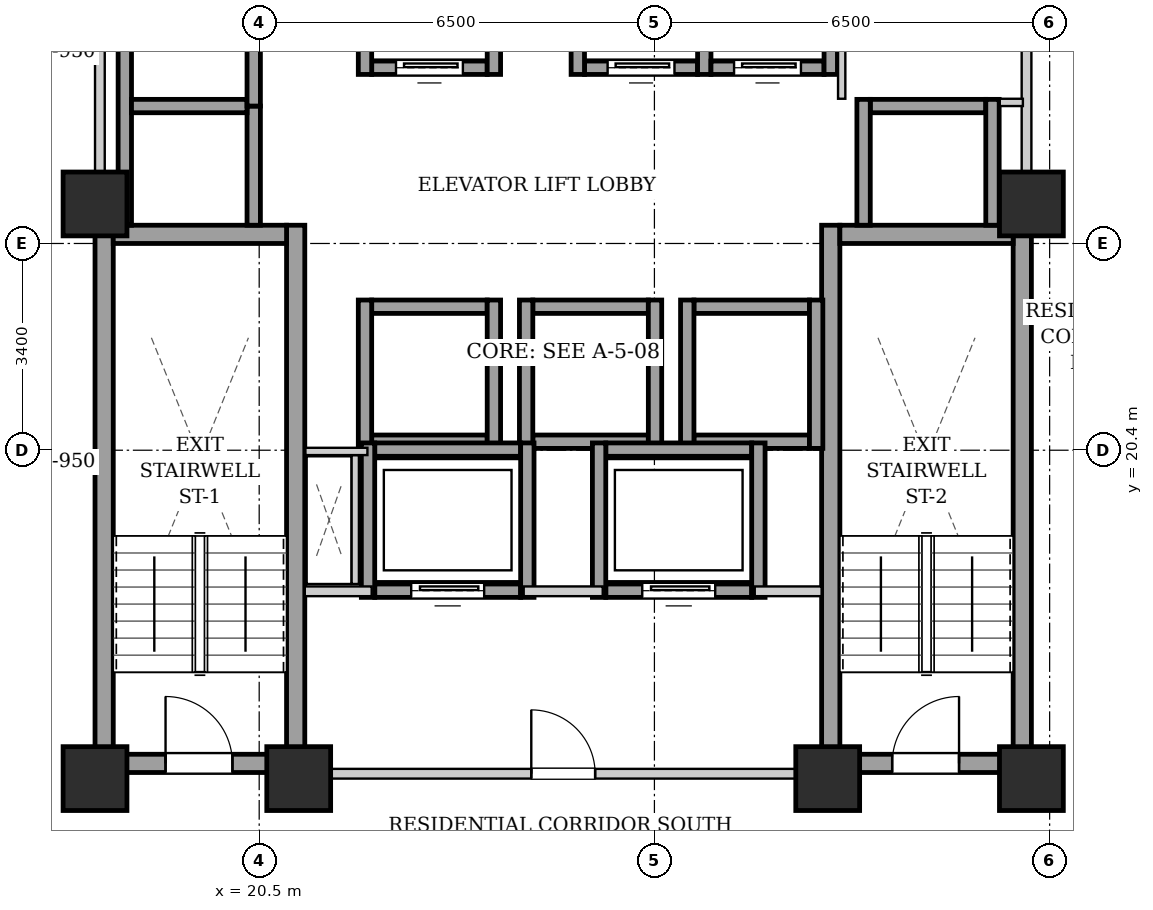
"""IFC4 building model, lengths in metres.
Left out: names, types, materials, properties, quantities, classifications, styles, units other than length and angle.
Written with IfcOpenShell. Run it as: python <this file> out.ifc"""

import sys

from ifc_helpers import new_model, si_unit, direction, frame, frame_2d, origin, origin_2d, place, context, subcontext, project, spatial, rectangle, extrude, element, fill, save


model = new_model("IFC4")
c1 = context("Model", 3, precision=1e-05, world=origin(), true_north=direction((0.0, 1.0)))
c2 = subcontext(c1, "Body", "Model", "MODEL_VIEW")
j1 = project(units=[si_unit("LENGTHUNIT", "METRE"), si_unit("PLANEANGLEUNIT", "RADIAN")], contexts=[c1])
p1 = place(None, origin())
s1 = spatial("IfcSite", under=j1, at=p1, CompositionType="ELEMENT")
p2 = place(p1, origin())
s2 = spatial("IfcBuilding", under=s1, at=p2, CompositionType="ELEMENT")
p3 = place(p2, frame((0.0, 0.0, 97.5)))
s3 = spatial("IfcBuildingStorey", under=s2, at=p3, CompositionType="ELEMENT", Elevation=97.5)
for number, where, z_axis, x_axis in (
    (1, (17.8, 15.0, 0.0), (0.0, 0.0, 1.0), (1.0, 0.0, 0.0)),
    (2, (21.15, 15.0, 0.0), (0.0, 0.0, 1.0), (1.0, 0.0, 0.0)),
    (3, (29.85, 15.0, 0.0), (0.0, 0.0, 1.0), (1.0, 0.0, 0.0)),
    (4, (33.2, 15.0, 0.0), (0.0, 0.0, 1.0), (1.0, 0.0, 0.0)),
    (5, (17.8, 24.45, 0.0), (0.0, 0.0, 1.0), (1.0, 0.0, 0.0)),
    (6, (33.2, 24.45, 0.0), (0.0, 0.0, 1.0), (1.0, 0.0, 0.0)),
):
    element("IfcColumn", number, at=place(p3, frame(where, z_axis=z_axis, x_axis=x_axis)), inside=s3, PredefinedType="COLUMN", context=c2, shape_type="SweptSolid", body=[
        extrude(rectangle(XDim=1.05, YDim=1.05, at=origin_2d()), origin(), (0.0, 0.0, 1.0), 3.2),
    ])
for number, where, z_axis, x_axis in (
    (7, (17.95, 15.1, 0.0), (0.0, 0.0, 1.0), (0.0, 1.0, 0.0)),
    (8, (21.1, 15.1, 0.0), (0.0, 0.0, 1.0), (0.0, 1.0, 0.0)),
):
    element("IfcWall", number, at=place(p3, frame(where, z_axis=z_axis, x_axis=x_axis)), inside=s3, PredefinedType="SHEAR", context=c2, shape_type="SweptSolid", body=[
        extrude(rectangle(XDim=9.0, YDim=0.3, at=frame_2d((4.5, 0.0))), origin(), (0.0, 0.0, 1.0), 2.94),
    ])
p4 = place(p3, frame((18.1, 23.95, 0.0), z_axis=(0.0, 0.0, 1.0), x_axis=(1.0, 0.0, 0.0)))
e9 = element("IfcWall", 9, at=p4, inside=s3, PredefinedType="SHEAR", context=c2, shape_type="SweptSolid", body=[
    extrude(rectangle(XDim=2.85, YDim=0.3, at=frame_2d((1.425, 0.0))), origin(), (0.0, 0.0, 1.0), 2.94),
])
p5 = place(p3, frame((18.1, 15.25, 0.0), z_axis=(0.0, 0.0, 1.0), x_axis=(1.0, 0.0, 0.0)))
e10 = element("IfcWall", 10, at=p5, inside=s3, PredefinedType="SHEAR", context=c2, shape_type="SweptSolid", body=[
    extrude(rectangle(XDim=2.85, YDim=0.3, at=frame_2d((1.425, 0.0))), origin(), (0.0, 0.0, 1.0), 2.94),
])
p6 = place(p5, frame((0.86, 0.0, 0.0)))
e11 = element("IfcOpeningElement", 11, at=p6, cuts=e10, PredefinedType="OPENING", context=c2, shape_type="SweptSolid", body=[
    extrude(rectangle(XDim=1.1, YDim=2.05, at=frame_2d((0.55, 1.025))), frame((0.0, 0.16, 0.0), z_axis=(0.0, -1.0, 0.0), x_axis=(1.0, 0.0, 0.0)), (0.0, 0.0, 1.0), 0.32),
])
for number, where, z_axis, x_axis in (
    (12, (29.9, 15.1, 0.0), (0.0, 0.0, 1.0), (0.0, 1.0, 0.0)),
    (13, (33.05, 15.1, 0.0), (0.0, 0.0, 1.0), (0.0, 1.0, 0.0)),
):
    element("IfcWall", number, at=place(p3, frame(where, z_axis=z_axis, x_axis=x_axis)), inside=s3, PredefinedType="SHEAR", context=c2, shape_type="SweptSolid", body=[
        extrude(rectangle(XDim=9.0, YDim=0.3, at=frame_2d((4.5, 0.0))), origin(), (0.0, 0.0, 1.0), 2.94),
    ])
p7 = place(p3, frame((30.05, 23.95, 0.0), z_axis=(0.0, 0.0, 1.0), x_axis=(1.0, 0.0, 0.0)))
e14 = element("IfcWall", 14, at=p7, inside=s3, PredefinedType="SHEAR", context=c2, shape_type="SweptSolid", body=[
    extrude(rectangle(XDim=2.85, YDim=0.3, at=frame_2d((1.425, 0.0))), origin(), (0.0, 0.0, 1.0), 2.94),
])
p8 = place(p3, frame((30.05, 15.25, 0.0), z_axis=(0.0, 0.0, 1.0), x_axis=(1.0, 0.0, 0.0)))
e15 = element("IfcWall", 15, at=p8, inside=s3, PredefinedType="SHEAR", context=c2, shape_type="SweptSolid", body=[
    extrude(rectangle(XDim=2.85, YDim=0.3, at=frame_2d((1.425, 0.0))), origin(), (0.0, 0.0, 1.0), 2.94),
])
p9 = place(p8, frame((0.86, 0.0, 0.0)))
e16 = element("IfcOpeningElement", 16, at=p9, cuts=e15, PredefinedType="OPENING", context=c2, shape_type="SweptSolid", body=[
    extrude(rectangle(XDim=1.1, YDim=2.05, at=frame_2d((0.55, 1.025))), frame((0.0, 0.16, 0.0), z_axis=(0.0, -1.0, 0.0), x_axis=(1.0, 0.0, 0.0)), (0.0, 0.0, 1.0), 0.32),
])
p10 = place(p3, frame((22.35, 26.69, 0.0), z_axis=(0.0, 0.0, 1.0), x_axis=(1.0, 0.0, 0.0)))
e17 = element("IfcWall", 17, at=p10, inside=s3, PredefinedType="SHEAR", context=c2, shape_type="SweptSolid", body=[
    extrude(rectangle(XDim=1.9, YDim=0.22, at=frame_2d((0.95, 0.0))), origin(), (0.0, 0.0, 1.0), 2.94),
])
p11 = place(p10, frame((0.4, 0.0, 0.0)))
e18 = element("IfcOpeningElement", 18, at=p11, cuts=e17, PredefinedType="OPENING", context=c2, shape_type="SweptSolid", body=[
    extrude(rectangle(XDim=1.1, YDim=2.15, at=frame_2d((0.55, 1.075))), frame((0.0, 0.12, 0.0), z_axis=(0.0, -1.0, 0.0), x_axis=(1.0, 0.0, 0.0)), (0.0, 0.0, 1.0), 0.24),
])
for number, where, z_axis, x_axis in (
    (19, (22.24, 26.58, 0.0), (0.0, 0.0, 1.0), (0.0, 1.0, 0.0)),
    (20, (24.36, 26.58, 0.0), (0.0, 0.0, 1.0), (0.0, 1.0, 0.0)),
):
    element("IfcWall", number, at=place(p3, frame(where, z_axis=z_axis, x_axis=x_axis)), inside=s3, PredefinedType="SHEAR", context=c2, shape_type="SweptSolid", body=[
        extrude(rectangle(XDim=2.44, YDim=0.22, at=frame_2d((1.22, 0.0))), origin(), (0.0, 0.0, 1.0), 2.94),
    ])
p12 = place(p3, frame((25.85, 26.69, 0.0), z_axis=(0.0, 0.0, 1.0), x_axis=(1.0, 0.0, 0.0)))
e21 = element("IfcWall", 21, at=p12, inside=s3, PredefinedType="SHEAR", context=c2, shape_type="SweptSolid", body=[
    extrude(rectangle(XDim=1.86, YDim=0.22, at=frame_2d((0.93, 0.0))), origin(), (0.0, 0.0, 1.0), 2.94),
])
p13 = place(p12, frame((0.38, 0.0, 0.0)))
e22 = element("IfcOpeningElement", 22, at=p13, cuts=e21, PredefinedType="OPENING", context=c2, shape_type="SweptSolid", body=[
    extrude(rectangle(XDim=1.1, YDim=2.15, at=frame_2d((0.55, 1.075))), frame((0.0, 0.12, 0.0), z_axis=(0.0, -1.0, 0.0), x_axis=(1.0, 0.0, 0.0)), (0.0, 0.0, 1.0), 0.24),
])
for number, where, z_axis, x_axis in (
    (23, (25.74, 26.58, 0.0), (0.0, 0.0, 1.0), (0.0, 1.0, 0.0)),
    (24, (27.82, 26.58, 0.0), (0.0, 0.0, 1.0), (0.0, 1.0, 0.0)),
):
    element("IfcWall", number, at=place(p3, frame(where, z_axis=z_axis, x_axis=x_axis)), inside=s3, PredefinedType="SHEAR", context=c2, shape_type="SweptSolid", body=[
        extrude(rectangle(XDim=2.44, YDim=0.22, at=frame_2d((1.22, 0.0))), origin(), (0.0, 0.0, 1.0), 2.94),
    ])
p14 = place(p3, frame((27.93, 26.69, 0.0), z_axis=(0.0, 0.0, 1.0), x_axis=(1.0, 0.0, 0.0)))
e25 = element("IfcWall", 25, at=p14, inside=s3, PredefinedType="SHEAR", context=c2, shape_type="SweptSolid", body=[
    extrude(rectangle(XDim=1.86, YDim=0.22, at=frame_2d((0.93, 0.0))), origin(), (0.0, 0.0, 1.0), 2.94),
])
p15 = place(p14, frame((0.38, 0.0, 0.0)))
e26 = element("IfcOpeningElement", 26, at=p15, cuts=e25, PredefinedType="OPENING", context=c2, shape_type="SweptSolid", body=[
    extrude(rectangle(XDim=1.1, YDim=2.15, at=frame_2d((0.55, 1.075))), frame((0.0, 0.12, 0.0), z_axis=(0.0, -1.0, 0.0), x_axis=(1.0, 0.0, 0.0)), (0.0, 0.0, 1.0), 0.24),
])
p16 = place(p3, frame((29.9, 26.58, 0.0), z_axis=(0.0, 0.0, 1.0), x_axis=(0.0, 1.0, 0.0)))
e27 = element("IfcWall", 27, at=p16, inside=s3, PredefinedType="SHEAR", context=c2, shape_type="SweptSolid", body=[
    extrude(rectangle(XDim=2.44, YDim=0.22, at=frame_2d((1.22, 0.0))), origin(), (0.0, 0.0, 1.0), 2.94),
])
for number, where, z_axis, x_axis in (
    (28, (22.35, 20.54, 0.0), (0.0, 0.0, 1.0), (1.0, 0.0, 0.0)),
    (29, (22.35, 22.76, 0.0), (0.0, 0.0, 1.0), (1.0, 0.0, 0.0)),
):
    element("IfcWall", number, at=place(p3, frame(where, z_axis=z_axis, x_axis=x_axis)), inside=s3, PredefinedType="SHEAR", context=c2, shape_type="SweptSolid", body=[
        extrude(rectangle(XDim=1.9, YDim=0.22, at=frame_2d((0.95, 0.0))), origin(), (0.0, 0.0, 1.0), 2.94),
    ])
for number, where, z_axis, x_axis in (
    (30, (22.24, 20.43, 0.0), (0.0, 0.0, 1.0), (0.0, 1.0, 0.0)),
    (31, (24.36, 20.43, 0.0), (0.0, 0.0, 1.0), (0.0, 1.0, 0.0)),
):
    element("IfcWall", number, at=place(p3, frame(where, z_axis=z_axis, x_axis=x_axis)), inside=s3, PredefinedType="SHEAR", context=c2, shape_type="SweptSolid", body=[
        extrude(rectangle(XDim=2.44, YDim=0.22, at=frame_2d((1.22, 0.0))), origin(), (0.0, 0.0, 1.0), 2.94),
    ])
for number, where, z_axis, x_axis in (
    (32, (25.0, 20.54, 0.0), (0.0, 0.0, 1.0), (1.0, 0.0, 0.0)),
    (33, (25.0, 22.76, 0.0), (0.0, 0.0, 1.0), (1.0, 0.0, 0.0)),
):
    element("IfcWall", number, at=place(p3, frame(where, z_axis=z_axis, x_axis=x_axis)), inside=s3, PredefinedType="SHEAR", context=c2, shape_type="SweptSolid", body=[
        extrude(rectangle(XDim=1.9, YDim=0.22, at=frame_2d((0.95, 0.0))), origin(), (0.0, 0.0, 1.0), 2.94),
    ])
for number, where, z_axis, x_axis in (
    (34, (24.89, 20.43, 0.0), (0.0, 0.0, 1.0), (0.0, 1.0, 0.0)),
    (35, (27.01, 20.43, 0.0), (0.0, 0.0, 1.0), (0.0, 1.0, 0.0)),
):
    element("IfcWall", number, at=place(p3, frame(where, z_axis=z_axis, x_axis=x_axis)), inside=s3, PredefinedType="SHEAR", context=c2, shape_type="SweptSolid", body=[
        extrude(rectangle(XDim=2.44, YDim=0.22, at=frame_2d((1.22, 0.0))), origin(), (0.0, 0.0, 1.0), 2.94),
    ])
for number, where, z_axis, x_axis in (
    (36, (27.65, 20.54, 0.0), (0.0, 0.0, 1.0), (1.0, 0.0, 0.0)),
    (37, (27.65, 22.76, 0.0), (0.0, 0.0, 1.0), (1.0, 0.0, 0.0)),
):
    element("IfcWall", number, at=place(p3, frame(where, z_axis=z_axis, x_axis=x_axis)), inside=s3, PredefinedType="SHEAR", context=c2, shape_type="SweptSolid", body=[
        extrude(rectangle(XDim=1.9, YDim=0.22, at=frame_2d((0.95, 0.0))), origin(), (0.0, 0.0, 1.0), 2.94),
    ])
for number, where, z_axis, x_axis in (
    (38, (27.54, 20.43, 0.0), (0.0, 0.0, 1.0), (0.0, 1.0, 0.0)),
    (39, (29.66, 20.43, 0.0), (0.0, 0.0, 1.0), (0.0, 1.0, 0.0)),
):
    element("IfcWall", number, at=place(p3, frame(where, z_axis=z_axis, x_axis=x_axis)), inside=s3, PredefinedType="SHEAR", context=c2, shape_type="SweptSolid", body=[
        extrude(rectangle(XDim=2.44, YDim=0.22, at=frame_2d((1.22, 0.0))), origin(), (0.0, 0.0, 1.0), 2.94),
    ])
p17 = place(p3, frame((18.29, 24.1, 0.0), z_axis=(0.0, 0.0, 1.0), x_axis=(0.0, 1.0, 0.0)))
e40 = element("IfcWall", 40, at=p17, inside=s3, PredefinedType="SHEAR", context=c2, shape_type="SweptSolid", body=[
    extrude(rectangle(XDim=4.14, YDim=0.22, at=frame_2d((2.07, 0.0))), origin(), (0.0, 0.0, 1.0), 2.94),
])
p18 = place(p3, frame((20.41, 24.1, 0.0), z_axis=(0.0, 0.0, 1.0), x_axis=(0.0, 1.0, 0.0)))
e41 = element("IfcWall", 41, at=p18, inside=s3, PredefinedType="SHEAR", context=c2, shape_type="SweptSolid", body=[
    extrude(rectangle(XDim=1.96, YDim=0.22, at=frame_2d((0.98, 0.0))), origin(), (0.0, 0.0, 1.0), 2.94),
])
p19 = place(p3, frame((18.4, 26.06, 0.0), z_axis=(0.0, 0.0, 1.0), x_axis=(1.0, 0.0, 0.0)))
e42 = element("IfcWall", 42, at=p19, inside=s3, PredefinedType="SHEAR", context=c2, shape_type="SweptSolid", body=[
    extrude(rectangle(XDim=1.9, YDim=0.22, at=frame_2d((0.95, 0.0))), origin(), (0.0, 0.0, 1.0), 2.94),
])
p20 = place(p3, frame((20.41, 26.06, 0.0), z_axis=(0.0, 0.0, 1.0), x_axis=(0.0, 1.0, 0.0)))
e43 = element("IfcWall", 43, at=p20, inside=s3, PredefinedType="SHEAR", context=c2, shape_type="SweptSolid", body=[
    extrude(rectangle(XDim=2.18, YDim=0.22, at=frame_2d((1.09, 0.0))), origin(), (0.0, 0.0, 1.0), 2.94),
])
p21 = place(p3, frame((30.55, 26.06, 0.0), z_axis=(0.0, 0.0, 1.0), x_axis=(1.0, 0.0, 0.0)))
e44 = element("IfcWall", 44, at=p21, inside=s3, PredefinedType="SHEAR", context=c2, shape_type="SweptSolid", body=[
    extrude(rectangle(XDim=1.9, YDim=0.22, at=frame_2d((0.95, 0.0))), origin(), (0.0, 0.0, 1.0), 2.94),
])
for number, where, z_axis, x_axis in (
    (45, (30.44, 24.1, 0.0), (0.0, 0.0, 1.0), (0.0, 1.0, 0.0)),
    (46, (32.56, 24.1, 0.0), (0.0, 0.0, 1.0), (0.0, 1.0, 0.0)),
):
    element("IfcWall", number, at=place(p3, frame(where, z_axis=z_axis, x_axis=x_axis)), inside=s3, PredefinedType="SHEAR", context=c2, shape_type="SweptSolid", body=[
        extrude(rectangle(XDim=2.07, YDim=0.22, at=frame_2d((1.035, 0.0))), origin(), (0.0, 0.0, 1.0), 2.94),
    ])
p22 = place(p3, frame((22.4, 18.09, 0.0), z_axis=(0.0, 0.0, 1.0), x_axis=(1.0, 0.0, 0.0)))
e47 = element("IfcWall", 47, at=p22, inside=s3, PredefinedType="SHEAR", context=c2, shape_type="SweptSolid", body=[
    extrude(rectangle(XDim=2.4, YDim=0.22, at=frame_2d((1.2, 0.0))), origin(), (0.0, 0.0, 1.0), 2.94),
])
p23 = place(p22, frame((0.6, 0.0, 0.0)))
e48 = element("IfcOpeningElement", 48, at=p23, cuts=e47, PredefinedType="OPENING", context=c2, shape_type="SweptSolid", body=[
    extrude(rectangle(XDim=1.2, YDim=2.15, at=frame_2d((0.6, 1.075))), frame((0.0, 0.12, 0.0), z_axis=(0.0, -1.0, 0.0), x_axis=(1.0, 0.0, 0.0)), (0.0, 0.0, 1.0), 0.24),
])
p24 = place(p3, frame((22.4, 20.41, 0.0), z_axis=(0.0, 0.0, 1.0), x_axis=(1.0, 0.0, 0.0)))
e49 = element("IfcWall", 49, at=p24, inside=s3, PredefinedType="SHEAR", context=c2, shape_type="SweptSolid", body=[
    extrude(rectangle(XDim=2.4, YDim=0.22, at=frame_2d((1.2, 0.0))), origin(), (0.0, 0.0, 1.0), 2.94),
])
for number, where, z_axis, x_axis in (
    (50, (22.29, 17.98, 0.0), (0.0, 0.0, 1.0), (0.0, 1.0, 0.0)),
    (51, (24.91, 17.98, 0.0), (0.0, 0.0, 1.0), (0.0, 1.0, 0.0)),
):
    element("IfcWall", number, at=place(p3, frame(where, z_axis=z_axis, x_axis=x_axis)), inside=s3, PredefinedType="SHEAR", context=c2, shape_type="SweptSolid", body=[
        extrude(rectangle(XDim=2.54, YDim=0.22, at=frame_2d((1.27, 0.0))), origin(), (0.0, 0.0, 1.0), 2.94),
    ])
p25 = place(p3, frame((26.2, 18.09, 0.0), z_axis=(0.0, 0.0, 1.0), x_axis=(1.0, 0.0, 0.0)))
e52 = element("IfcWall", 52, at=p25, inside=s3, PredefinedType="SHEAR", context=c2, shape_type="SweptSolid", body=[
    extrude(rectangle(XDim=2.4, YDim=0.22, at=frame_2d((1.2, 0.0))), origin(), (0.0, 0.0, 1.0), 2.94),
])
p26 = place(p25, frame((0.6, 0.0, 0.0)))
e53 = element("IfcOpeningElement", 53, at=p26, cuts=e52, PredefinedType="OPENING", context=c2, shape_type="SweptSolid", body=[
    extrude(rectangle(XDim=1.2, YDim=2.15, at=frame_2d((0.6, 1.075))), frame((0.0, 0.12, 0.0), z_axis=(0.0, -1.0, 0.0), x_axis=(1.0, 0.0, 0.0)), (0.0, 0.0, 1.0), 0.24),
])
p27 = place(p3, frame((26.2, 20.41, 0.0), z_axis=(0.0, 0.0, 1.0), x_axis=(1.0, 0.0, 0.0)))
e54 = element("IfcWall", 54, at=p27, inside=s3, PredefinedType="SHEAR", context=c2, shape_type="SweptSolid", body=[
    extrude(rectangle(XDim=2.4, YDim=0.22, at=frame_2d((1.2, 0.0))), origin(), (0.0, 0.0, 1.0), 2.94),
])
for number, where, z_axis, x_axis in (
    (55, (26.09, 17.98, 0.0), (0.0, 0.0, 1.0), (0.0, 1.0, 0.0)),
    (56, (28.71, 17.98, 0.0), (0.0, 0.0, 1.0), (0.0, 1.0, 0.0)),
):
    element("IfcWall", number, at=place(p3, frame(where, z_axis=z_axis, x_axis=x_axis)), inside=s3, PredefinedType="SHEAR", context=c2, shape_type="SweptSolid", body=[
        extrude(rectangle(XDim=2.54, YDim=0.22, at=frame_2d((1.27, 0.0))), origin(), (0.0, 0.0, 1.0), 2.94),
    ])
p28 = place(p3, frame((21.25, 15.08, 0.0), z_axis=(0.0, 0.0, 1.0), x_axis=(1.0, 0.0, 0.0)))
e57 = element("IfcWall", 57, at=p28, inside=s3, PredefinedType="PARTITIONING", context=c2, shape_type="SweptSolid", body=[
    extrude(rectangle(XDim=8.5, YDim=0.16, at=frame_2d((4.25, 0.0))), origin(), (0.0, 0.0, 1.0), 2.313),
])
p29 = place(p28, frame((3.725, 0.0, 0.0)))
e58 = element("IfcOpeningElement", 58, at=p29, cuts=e57, PredefinedType="OPENING", context=c2, shape_type="SweptSolid", body=[
    extrude(rectangle(XDim=1.05, YDim=2.05, at=frame_2d((0.525, 1.025))), frame((0.0, 0.09, 0.0), z_axis=(0.0, -1.0, 0.0), x_axis=(1.0, 0.0, 0.0)), (0.0, 0.0, 1.0), 0.18),
])
p30 = place(p3, frame((21.25, 18.08, 0.0), z_axis=(0.0, 0.0, 1.0), x_axis=(1.0, 0.0, 0.0)))
e59 = element("IfcWall", 59, at=p30, inside=s3, PredefinedType="PARTITIONING", context=c2, shape_type="SweptSolid", body=[
    extrude(rectangle(XDim=1.1, YDim=0.16, at=frame_2d((0.55, 0.0))), origin(), (0.0, 0.0, 1.0), 2.94),
])
p31 = place(p3, frame((24.85, 18.08, 0.0), z_axis=(0.0, 0.0, 1.0), x_axis=(1.0, 0.0, 0.0)))
e60 = element("IfcWall", 60, at=p31, inside=s3, PredefinedType="PARTITIONING", context=c2, shape_type="SweptSolid", body=[
    extrude(rectangle(XDim=1.3, YDim=0.16, at=frame_2d((0.65, 0.0))), origin(), (0.0, 0.0, 1.0), 2.94),
])
p32 = place(p3, frame((28.65, 18.08, 0.0), z_axis=(0.0, 0.0, 1.0), x_axis=(1.0, 0.0, 0.0)))
e61 = element("IfcWall", 61, at=p32, inside=s3, PredefinedType="PARTITIONING", context=c2, shape_type="SweptSolid", body=[
    extrude(rectangle(XDim=1.1, YDim=0.16, at=frame_2d((0.55, 0.0))), origin(), (0.0, 0.0, 1.0), 2.94),
])
for number, where, z_axis, x_axis in (
    (62, (17.88, 24.12, 0.0), (0.0, 0.0, 1.0), (0.0, 1.0, 0.0)),
    (63, (33.12, 24.12, 0.0), (0.0, 0.0, 1.0), (0.0, 1.0, 0.0)),
):
    element("IfcWall", number, at=place(p3, frame(where, z_axis=z_axis, x_axis=x_axis)), inside=s3, PredefinedType="PARTITIONING", context=c2, shape_type="SweptSolid", body=[
        extrude(rectangle(XDim=4.76, YDim=0.16, at=frame_2d((2.38, 0.0))), origin(), (0.0, 0.0, 1.0), 2.275),
    ])
p33 = place(p3, frame((22.08, 18.2, 0.0), z_axis=(0.0, 0.0, 1.0), x_axis=(0.0, 1.0, 0.0)))
e64 = element("IfcWall", 64, at=p33, inside=s3, PredefinedType="PARTITIONING", context=c2, shape_type="SweptSolid", body=[
    extrude(rectangle(XDim=2.12, YDim=0.12, at=frame_2d((1.06, 0.0))), origin(), (0.0, 0.0, 1.0), 2.94),
])
p34 = place(p3, frame((22.28, 20.38, 0.0), z_axis=(0.0, 0.0, 1.0), x_axis=(-1.0, 0.0, 0.0)))
e65 = element("IfcWall", 65, at=p34, inside=s3, PredefinedType="PARTITIONING", context=c2, shape_type="SweptSolid", body=[
    extrude(rectangle(XDim=1.02, YDim=0.12, at=frame_2d((0.51, 0.0))), origin(), (0.0, 0.0, 1.0), 2.94),
])
p35 = place(p3, frame((30.08, 26.18, 0.0), z_axis=(0.0, 0.0, 1.0), x_axis=(0.0, 1.0, 0.0)))
e66 = element("IfcWall", 66, at=p35, inside=s3, PredefinedType="PARTITIONING", context=c2, shape_type="SweptSolid", body=[
    extrude(rectangle(XDim=2.68, YDim=0.12, at=frame_2d((1.34, 0.0))), origin(), (0.0, 0.0, 1.0), 2.94),
])
p36 = place(p3, frame((32.68, 26.12, 0.0), z_axis=(0.0, 0.0, 1.0), x_axis=(1.0, 0.0, 0.0)))
e67 = element("IfcWall", 67, at=p36, inside=s3, PredefinedType="PARTITIONING", context=c2, shape_type="SweptSolid", body=[
    extrude(rectangle(XDim=0.38, YDim=0.12, at=frame_2d((0.19, 0.0))), origin(), (0.0, 0.0, 1.0), 2.94),
])
p37 = place(p6, origin())
e68 = element("IfcDoor", 68, at=p37, inside=s3, OperationType="SINGLE_SWING_LEFT", PredefinedType="DOOR", context=c2, shape_type="SweptSolid", body=[
    extrude(rectangle(XDim=1.1, YDim=2.05, at=frame_2d((0.55, 1.025))), frame((0.0, 0.025, 0.0), z_axis=(0.0, -1.0, 0.0), x_axis=(1.0, 0.0, 0.0)), (0.0, 0.0, 1.0), 0.05),
])
fill(e11, e68)
p38 = place(p9, origin())
e69 = element("IfcDoor", 69, at=p38, inside=s3, OperationType="SINGLE_SWING_RIGHT", PredefinedType="DOOR", context=c2, shape_type="SweptSolid", body=[
    extrude(rectangle(XDim=1.1, YDim=2.05, at=frame_2d((0.55, 1.025))), frame((0.0, 0.025, 0.0), z_axis=(0.0, -1.0, 0.0), x_axis=(1.0, 0.0, 0.0)), (0.0, 0.0, 1.0), 0.05),
])
fill(e16, e69)
p39 = place(p11, origin())
e70 = element("IfcDoor", 70, at=p39, inside=s3, OperationType="SLIDING_TO_LEFT", PredefinedType="DOOR", context=c2, shape_type="SweptSolid", body=[
    extrude(rectangle(XDim=1.1, YDim=2.15, at=frame_2d((0.55, 1.075))), frame((0.0, 0.025, 0.0), z_axis=(0.0, -1.0, 0.0), x_axis=(1.0, 0.0, 0.0)), (0.0, 0.0, 1.0), 0.05),
])
fill(e18, e70)
p40 = place(p13, origin())
e71 = element("IfcDoor", 71, at=p40, inside=s3, OperationType="SLIDING_TO_LEFT", PredefinedType="DOOR", context=c2, shape_type="SweptSolid", body=[
    extrude(rectangle(XDim=1.1, YDim=2.15, at=frame_2d((0.55, 1.075))), frame((0.0, 0.025, 0.0), z_axis=(0.0, -1.0, 0.0), x_axis=(1.0, 0.0, 0.0)), (0.0, 0.0, 1.0), 0.05),
])
fill(e22, e71)
p41 = place(p15, origin())
e72 = element("IfcDoor", 72, at=p41, inside=s3, OperationType="SLIDING_TO_LEFT", PredefinedType="DOOR", context=c2, shape_type="SweptSolid", body=[
    extrude(rectangle(XDim=1.1, YDim=2.15, at=frame_2d((0.55, 1.075))), frame((0.0, 0.025, 0.0), z_axis=(0.0, -1.0, 0.0), x_axis=(1.0, 0.0, 0.0)), (0.0, 0.0, 1.0), 0.05),
])
fill(e26, e72)
p42 = place(p23, origin())
e73 = element("IfcDoor", 73, at=p42, inside=s3, OperationType="SLIDING_TO_LEFT", PredefinedType="DOOR", context=c2, shape_type="SweptSolid", body=[
    extrude(rectangle(XDim=1.2, YDim=2.15, at=frame_2d((0.6, 1.075))), frame((0.0, 0.025, 0.0), z_axis=(0.0, -1.0, 0.0), x_axis=(1.0, 0.0, 0.0)), (0.0, 0.0, 1.0), 0.05),
])
fill(e48, e73)
p43 = place(p26, origin())
e74 = element("IfcDoor", 74, at=p43, inside=s3, OperationType="SLIDING_TO_LEFT", PredefinedType="DOOR", context=c2, shape_type="SweptSolid", body=[
    extrude(rectangle(XDim=1.2, YDim=2.15, at=frame_2d((0.6, 1.075))), frame((0.0, 0.025, 0.0), z_axis=(0.0, -1.0, 0.0), x_axis=(1.0, 0.0, 0.0)), (0.0, 0.0, 1.0), 0.05),
])
fill(e53, e74)
p44 = place(p29, origin())
e75 = element("IfcDoor", 75, at=p44, inside=s3, OperationType="SINGLE_SWING_LEFT", PredefinedType="DOOR", context=c2, shape_type="SweptSolid", body=[
    extrude(rectangle(XDim=1.05, YDim=2.05, at=frame_2d((0.525, 1.025))), frame((0.0, 0.025, 0.0), z_axis=(0.0, -1.0, 0.0), x_axis=(1.0, 0.0, 0.0)), (0.0, 0.0, 1.0), 0.05),
])
fill(e58, e75)
save(model, sys.argv[1])
